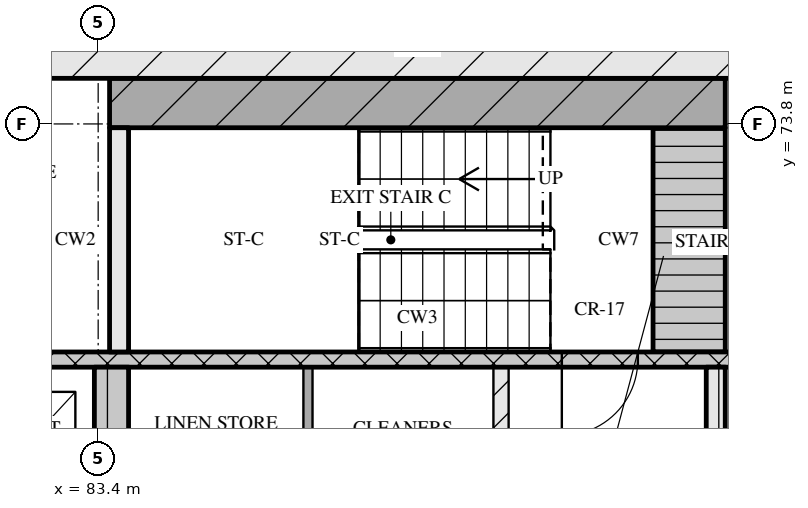
"""IFC4 building model, lengths in metres.
Left out: names, types, materials, properties, quantities, classifications, styles, units other than length and angle.
Written with IfcOpenShell. Run it as: python <this file> out.ifc"""

import sys

from ifc_helpers import new_model, si_unit, direction, frame, frame_2d, origin, place, context, subcontext, project, spatial, rectangle, extrude, element, fill, save


model = new_model("IFC4")
c1 = context("Model", 3, precision=1e-05, world=origin(), true_north=direction((0.0, 1.0)))
c2 = subcontext(c1, "Body", "Model", "MODEL_VIEW")
j1 = project(units=[si_unit("LENGTHUNIT", "METRE"), si_unit("PLANEANGLEUNIT", "RADIAN")], contexts=[c1])
p1 = place(None, origin())
s1 = spatial("IfcSite", under=j1, at=p1, CompositionType="ELEMENT")
p2 = place(p1, origin())
s2 = spatial("IfcBuilding", under=s1, at=p2, CompositionType="ELEMENT")
p3 = place(p2, frame((0.0, 0.0, 62.4)))
s3 = spatial("IfcBuildingStorey", under=s2, at=p3, CompositionType="ELEMENT", Elevation=62.4)
p4 = place(p3, frame((66.6, 75.0, 0.0), z_axis=(0.0, 0.0, 1.0), x_axis=(1.0, 0.0, 0.0)))
e1 = element("IfcWall", 1, at=p4, inside=s3, PredefinedType="SOLIDWALL", context=c2, shape_type="SweptSolid", body=[
    extrude(rectangle(XDim=42.0, YDim=1.2, at=frame_2d((21.0, 0.0))), origin(), (0.0, 0.0, 1.0), 3.32),
])
p5 = place(p3, frame((83.575, 68.0, 0.0), z_axis=(0.0, 0.0, 1.0), x_axis=(0.0, 1.0, 0.0)))
e2 = element("IfcWall", 2, at=p5, inside=s3, PredefinedType="SOLIDWALL", context=c2, shape_type="SweptSolid", body=[
    extrude(rectangle(XDim=2.6, YDim=0.45, at=frame_2d((1.3, 0.0))), origin(), (0.0, 0.0, 1.0), 3.32),
])
p6 = place(p3, frame((86.16, 68.0, 0.0), z_axis=(0.0, 0.0, 1.0), x_axis=(0.0, 1.0, 0.0)))
e3 = element("IfcWall", 3, at=p6, inside=s3, PredefinedType="PARTITIONING", context=c2, shape_type="SweptSolid", body=[
    extrude(rectangle(XDim=2.6, YDim=0.12, at=frame_2d((1.3, 0.0))), origin(), (0.0, 0.0, 1.0), 3.32),
])
p7 = place(p3, frame((88.7, 68.0, 0.0), z_axis=(0.0, 0.0, 1.0), x_axis=(0.0, 1.0, 0.0)))
e4 = element("IfcWall", 4, at=p7, inside=s3, PredefinedType="PARTITIONING", context=c2, shape_type="SweptSolid", body=[
    extrude(rectangle(XDim=2.6, YDim=0.2, at=frame_2d((1.3, 0.0))), origin(), (0.0, 0.0, 1.0), 3.32),
])
p8 = place(p3, frame((91.525, 68.0, 0.0), z_axis=(0.0, 0.0, 1.0), x_axis=(0.0, 1.0, 0.0)))
e5 = element("IfcWall", 5, at=p8, inside=s3, PredefinedType="SOLIDWALL", context=c2, shape_type="SweptSolid", body=[
    extrude(rectangle(XDim=2.6, YDim=0.25, at=frame_2d((1.3, 0.0))), origin(), (0.0, 0.0, 1.0), 3.32),
])
p9 = place(p3, frame((67.8, 70.7, 0.0), z_axis=(0.0, 0.0, 1.0), x_axis=(1.0, 0.0, 0.0)))
e6 = element("IfcWall", 6, at=p9, inside=s3, PredefinedType="SOLIDWALL", context=c2, shape_type="SweptSolid", body=[
    extrude(rectangle(XDim=39.6, YDim=0.2, at=frame_2d((19.8, 0.0))), origin(), (0.0, 0.0, 1.0), 3.32),
])
p10 = place(p9, frame((0.65, 0.0, 0.0)))
e7 = element("IfcOpeningElement", 7, at=p10, cuts=e6, PredefinedType="OPENING", context=c2, shape_type="SweptSolid", body=[
    extrude(rectangle(XDim=1.1, YDim=2.1, at=frame_2d((0.55, 1.05))), frame((0.0, 0.11, 0.0), z_axis=(0.0, -1.0, 0.0), x_axis=(1.0, 0.0, 0.0)), (0.0, 0.0, 1.0), 0.22),
])
p11 = place(p9, frame((3.25, 0.0, 0.0)))
e8 = element("IfcOpeningElement", 8, at=p11, cuts=e6, PredefinedType="OPENING", context=c2, shape_type="SweptSolid", body=[
    extrude(rectangle(XDim=1.1, YDim=2.1, at=frame_2d((0.55, 1.05))), frame((0.0, 0.11, 0.0), z_axis=(0.0, -1.0, 0.0), x_axis=(1.0, 0.0, 0.0)), (0.0, 0.0, 1.0), 0.22),
])
p12 = place(p9, frame((5.9, 0.0, 0.0)))
e9 = element("IfcOpeningElement", 9, at=p12, cuts=e6, PredefinedType="OPENING", context=c2, shape_type="SweptSolid", body=[
    extrude(rectangle(XDim=1.0, YDim=2.1, at=frame_2d((0.5, 1.05))), frame((0.0, 0.11, 0.0), z_axis=(0.0, -1.0, 0.0), x_axis=(1.0, 0.0, 0.0)), (0.0, 0.0, 1.0), 0.22),
])
p13 = place(p9, frame((21.7, 0.0, 0.0)))
e10 = element("IfcOpeningElement", 10, at=p13, cuts=e6, PredefinedType="OPENING", context=c2, shape_type="SweptSolid", body=[
    extrude(rectangle(XDim=1.0, YDim=2.1, at=frame_2d((0.5, 1.05))), frame((0.0, 0.11, 0.0), z_axis=(0.0, -1.0, 0.0), x_axis=(1.0, 0.0, 0.0)), (0.0, 0.0, 1.0), 0.22),
])
p14 = place(p9, frame((32.7, 0.0, 0.0)))
e11 = element("IfcOpeningElement", 11, at=p14, cuts=e6, PredefinedType="OPENING", context=c2, shape_type="SweptSolid", body=[
    extrude(rectangle(XDim=1.0, YDim=2.1, at=frame_2d((0.5, 1.05))), frame((0.0, 0.11, 0.0), z_axis=(0.0, -1.0, 0.0), x_axis=(1.0, 0.0, 0.0)), (0.0, 0.0, 1.0), 0.22),
])
p15 = place(p9, frame((35.25, 0.0, 0.0)))
e12 = element("IfcOpeningElement", 12, at=p15, cuts=e6, PredefinedType="OPENING", context=c2, shape_type="SweptSolid", body=[
    extrude(rectangle(XDim=1.1, YDim=2.1, at=frame_2d((0.55, 1.05))), frame((0.0, 0.11, 0.0), z_axis=(0.0, -1.0, 0.0), x_axis=(1.0, 0.0, 0.0)), (0.0, 0.0, 1.0), 0.22),
])
p16 = place(p9, frame((37.85, 0.0, 0.0)))
e13 = element("IfcOpeningElement", 13, at=p16, cuts=e6, PredefinedType="OPENING", context=c2, shape_type="SweptSolid", body=[
    extrude(rectangle(XDim=1.1, YDim=2.1, at=frame_2d((0.55, 1.05))), frame((0.0, 0.11, 0.0), z_axis=(0.0, -1.0, 0.0), x_axis=(1.0, 0.0, 0.0)), (0.0, 0.0, 1.0), 0.22),
])
p17 = place(p3, frame((83.675, 70.8, 0.0), z_axis=(0.0, 0.0, 1.0), x_axis=(0.0, 1.0, 0.0)))
e14 = element("IfcWall", 14, at=p17, inside=s3, PredefinedType="SOLIDWALL", context=c2, shape_type="SweptSolid", body=[
    extrude(rectangle(XDim=2.95, YDim=0.25, at=frame_2d((1.475, 0.0))), origin(), (0.0, 0.0, 1.0), 3.32),
])
p18 = place(p3, frame((91.175, 70.8, 0.0), z_axis=(0.0, 0.0, 1.0), x_axis=(0.0, 1.0, 0.0)))
e15 = element("IfcWall", 15, at=p18, inside=s3, PredefinedType="SOLIDWALL", context=c2, shape_type="SweptSolid", body=[
    extrude(rectangle(XDim=2.95, YDim=0.95, at=frame_2d((1.475, 0.0))), origin(), (0.0, 0.0, 1.0), 3.32),
])
p19 = place(p3, frame((83.55, 74.075, 0.0), z_axis=(0.0, 0.0, 1.0), x_axis=(1.0, 0.0, 0.0)))
e16 = element("IfcWall", 16, at=p19, inside=s3, PredefinedType="SOLIDWALL", context=c2, shape_type="SweptSolid", body=[
    extrude(rectangle(XDim=8.1, YDim=0.65, at=frame_2d((4.05, 0.0))), origin(), (0.0, 0.0, 1.0), 3.32),
])
p20 = place(p13, origin())
e17 = element("IfcDoor", 17, at=p20, inside=s3, OperationType="SINGLE_SWING_RIGHT", PredefinedType="DOOR", context=c2, shape_type="SweptSolid", body=[
    extrude(rectangle(XDim=1.0, YDim=2.1, at=frame_2d((0.5, 1.05))), frame((0.0, 0.025, 0.0), z_axis=(0.0, -1.0, 0.0), x_axis=(1.0, 0.0, 0.0)), (0.0, 0.0, 1.0), 0.05),
])
fill(e10, e17)
save(model, sys.argv[1])
